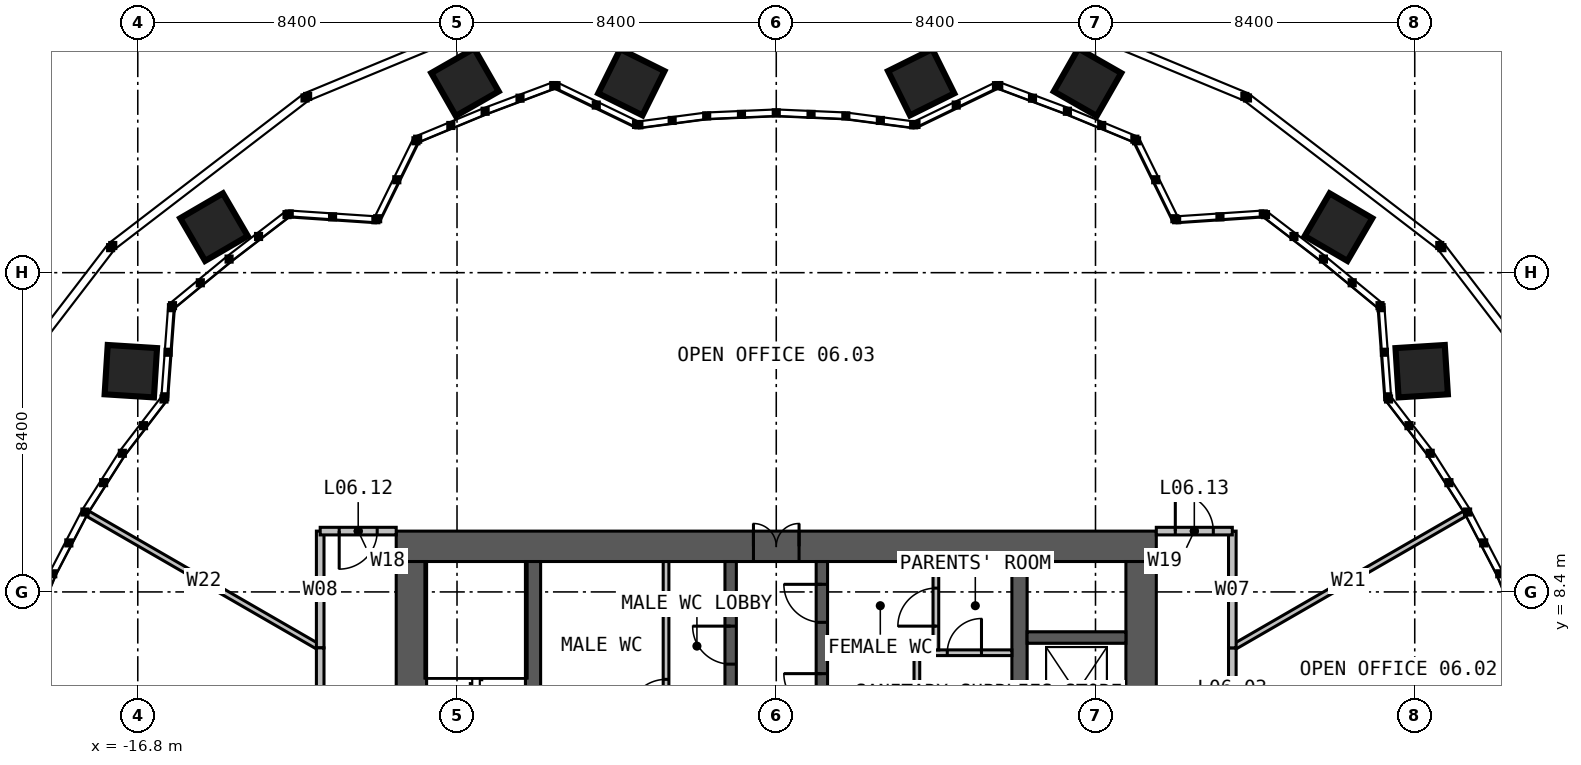
"""IFC4 building model, lengths in metres.
Left out: names, types, materials, properties, quantities, classifications, styles, units other than length and angle.
Written with IfcOpenShell. Run it as: python <this file> out.ifc"""

import sys

from ifc_helpers import new_model, si_unit, direction, frame, frame_2d, origin, place, context, subcontext, project, spatial, rectangle, extrude, element, fill, save


model = new_model("IFC4")
c1 = context("Model", 3, precision=1e-05, world=origin(), true_north=direction((0.0, 1.0)))
c2 = subcontext(c1, "Body", "Model", "MODEL_VIEW")
j1 = project(units=[si_unit("LENGTHUNIT", "METRE"), si_unit("PLANEANGLEUNIT", "RADIAN")], contexts=[c1])
p1 = place(None, origin())
s1 = spatial("IfcSite", under=j1, at=p1, CompositionType="ELEMENT")
p2 = place(p1, origin())
s2 = spatial("IfcBuilding", under=s1, at=p2, CompositionType="ELEMENT")
p3 = place(p2, frame((0.0, 0.0, 29.0)))
s3 = spatial("IfcBuildingStorey", under=s2, at=p3, CompositionType="ELEMENT", Elevation=29.0)
p4 = place(p3, frame((-10.0, 9.6, 0.0), z_axis=(0.0, 0.0, 1.0), x_axis=(1.0, 0.0, 0.0)))
e1 = element("IfcWall", 1, at=p4, inside=s3, PredefinedType="SOLIDWALL", context=c2, shape_type="SweptSolid", body=[
    extrude(rectangle(XDim=20.0, YDim=0.8, at=frame_2d((10.0, 0.0))), origin(), (0.0, 0.0, 1.0), 4.0),
])
p5 = place(p4, frame((9.4, 0.0, 0.0)))
e2 = element("IfcOpeningElement", 2, at=p5, cuts=e1, PredefinedType="OPENING", context=c2, shape_type="SweptSolid", body=[
    extrude(rectangle(XDim=1.2, YDim=2.2, at=frame_2d((0.6, 1.1))), frame((0.0, 0.41, 0.0), z_axis=(0.0, -1.0, 0.0), x_axis=(1.0, 0.0, 0.0)), (0.0, 0.0, 1.0), 0.82),
])
for number, where, z_axis, x_axis in (
    (3, (9.6, -9.2, 0.0), (0.0, 0.0, 1.0), (0.0, 1.0, 0.0)),
    (4, (-9.6, 9.2, 0.0), (0.0, 0.0, 1.0), (0.0, -1.0, 0.0)),
):
    element("IfcWall", number, at=place(p3, frame(where, z_axis=z_axis, x_axis=x_axis)), inside=s3, PredefinedType="SOLIDWALL", context=c2, shape_type="SweptSolid", body=[
        extrude(rectangle(XDim=18.4, YDim=0.8, at=frame_2d((9.2, 0.0))), origin(), (0.0, 0.0, 1.0), 4.0),
    ])
p6 = place(p3, frame((-6.4, -9.2, 0.0), z_axis=(0.0, 0.0, 1.0), x_axis=(0.0, 1.0, 0.0)))
e5 = element("IfcWall", 5, at=p6, inside=s3, PredefinedType="SOLIDWALL", context=c2, shape_type="SweptSolid", body=[
    extrude(rectangle(XDim=18.4, YDim=0.4, at=frame_2d((9.2, 0.0))), origin(), (0.0, 0.0, 1.0), 4.0),
])
p7 = place(p6, frame((8.7, 0.0, 0.0)))
e6 = element("IfcOpeningElement", 6, at=p7, cuts=e5, PredefinedType="OPENING", context=c2, shape_type="SweptSolid", body=[
    extrude(rectangle(XDim=1.0, YDim=2.2, at=frame_2d((0.5, 1.1))), frame((0.0, 0.21, 0.0), z_axis=(0.0, -1.0, 0.0), x_axis=(1.0, 0.0, 0.0)), (0.0, 0.0, 1.0), 0.42),
])
p8 = place(p3, frame((6.4, 9.2, 0.0), z_axis=(0.0, 0.0, 1.0), x_axis=(0.0, -1.0, 0.0)))
e7 = element("IfcWall", 7, at=p8, inside=s3, PredefinedType="SOLIDWALL", context=c2, shape_type="SweptSolid", body=[
    extrude(rectangle(XDim=18.4, YDim=0.4, at=frame_2d((9.2, 0.0))), origin(), (0.0, 0.0, 1.0), 4.0),
])
p9 = place(p8, frame((8.7, 0.0, 0.0)))
e8 = element("IfcOpeningElement", 8, at=p9, cuts=e7, PredefinedType="OPENING", context=c2, shape_type="SweptSolid", body=[
    extrude(rectangle(XDim=1.0, YDim=2.2, at=frame_2d((0.5, 1.1))), frame((0.0, 0.21, 0.0), z_axis=(0.0, -1.0, 0.0), x_axis=(1.0, 0.0, 0.0)), (0.0, 0.0, 1.0), 0.42),
])
p10 = place(p3, frame((-1.2, 1.45, 0.0), z_axis=(0.0, 0.0, 1.0), x_axis=(0.0, 1.0, 0.0)))
e9 = element("IfcWall", 9, at=p10, inside=s3, PredefinedType="SOLIDWALL", context=c2, shape_type="SweptSolid", body=[
    extrude(rectangle(XDim=7.75, YDim=0.3, at=frame_2d((3.875, 0.0))), origin(), (0.0, 0.0, 1.0), 4.0),
])
p11 = place(p10, frame((5.05, 0.0, 0.0)))
e10 = element("IfcOpeningElement", 10, at=p11, cuts=e9, PredefinedType="OPENING", context=c2, shape_type="SweptSolid", body=[
    extrude(rectangle(XDim=1.0, YDim=2.2, at=frame_2d((0.5, 1.1))), frame((0.0, 0.16, 0.0), z_axis=(0.0, -1.0, 0.0), x_axis=(1.0, 0.0, 0.0)), (0.0, 0.0, 1.0), 0.32),
])
p12 = place(p3, frame((1.2, 1.45, 0.0), z_axis=(0.0, 0.0, 1.0), x_axis=(0.0, 1.0, 0.0)))
e11 = element("IfcWall", 11, at=p12, inside=s3, PredefinedType="SOLIDWALL", context=c2, shape_type="SweptSolid", body=[
    extrude(rectangle(XDim=7.75, YDim=0.3, at=frame_2d((3.875, 0.0))), origin(), (0.0, 0.0, 1.0), 4.0),
])
p13 = place(p12, frame((3.8, 0.0, 0.0)))
e12 = element("IfcOpeningElement", 12, at=p13, cuts=e11, PredefinedType="OPENING", context=c2, shape_type="SweptSolid", body=[
    extrude(rectangle(XDim=1.0, YDim=2.2, at=frame_2d((0.5, 1.1))), frame((0.0, 0.16, 0.0), z_axis=(0.0, -1.0, 0.0), x_axis=(1.0, 0.0, 0.0)), (0.0, 0.0, 1.0), 0.32),
])
p14 = place(p12, frame((6.15, 0.0, 0.0)))
e13 = element("IfcOpeningElement", 13, at=p14, cuts=e11, PredefinedType="OPENING", context=c2, shape_type="SweptSolid", body=[
    extrude(rectangle(XDim=1.0, YDim=2.2, at=frame_2d((0.5, 1.1))), frame((0.0, 0.16, 0.0), z_axis=(0.0, -1.0, 0.0), x_axis=(1.0, 0.0, 0.0)), (0.0, 0.0, 1.0), 0.32),
])
p15 = place(p3, frame((6.6, 7.2, 0.0), z_axis=(0.0, 0.0, 1.0), x_axis=(1.0, 0.0, 0.0)))
e14 = element("IfcWall", 14, at=p15, inside=s3, PredefinedType="SOLIDWALL", context=c2, shape_type="SweptSolid", body=[
    extrude(rectangle(XDim=2.6, YDim=0.3, at=frame_2d((1.3, 0.0))), origin(), (0.0, 0.0, 1.0), 4.0),
])
p16 = place(p3, frame((1.35, 6.8, 0.0), z_axis=(0.0, 0.0, 1.0), x_axis=(1.0, 0.0, 0.0)))
e15 = element("IfcWall", 15, at=p16, inside=s3, PredefinedType="PARTITIONING", context=c2, shape_type="SweptSolid", body=[
    extrude(rectangle(XDim=4.85, YDim=0.15, at=frame_2d((2.425, 0.0))), origin(), (0.0, 0.0, 1.0), 3.75),
])
p17 = place(p16, frame((3.15, 0.0, 0.0)))
e16 = element("IfcOpeningElement", 16, at=p17, cuts=e15, PredefinedType="OPENING", context=c2, shape_type="SweptSolid", body=[
    extrude(rectangle(XDim=0.9, YDim=2.2, at=frame_2d((0.45, 1.1))), frame((0.0, 0.085, 0.0), z_axis=(0.0, -1.0, 0.0), x_axis=(1.0, 0.0, 0.0)), (0.0, 0.0, 1.0), 0.17),
])
p18 = place(p3, frame((3.7, 4.75, 0.0), z_axis=(0.0, 0.0, 1.0), x_axis=(0.0, 1.0, 0.0)))
e17 = element("IfcWall", 17, at=p18, inside=s3, PredefinedType="PARTITIONING", context=c2, shape_type="SweptSolid", body=[
    extrude(rectangle(XDim=1.975, YDim=0.15, at=frame_2d((0.988, 0.0))), origin(), (0.0, 0.0, 1.0), 3.75),
])
p19 = place(p3, frame((4.2, 6.875, 0.0), z_axis=(0.0, 0.0, 1.0), x_axis=(0.0, 1.0, 0.0)))
e18 = element("IfcWall", 18, at=p19, inside=s3, PredefinedType="PARTITIONING", context=c2, shape_type="SweptSolid", body=[
    extrude(rectangle(XDim=2.325, YDim=0.15, at=frame_2d((1.163, 0.0))), origin(), (0.0, 0.0, 1.0), 3.75),
])
p20 = place(p19, frame((0.625, 0.0, 0.0)))
e19 = element("IfcOpeningElement", 19, at=p20, cuts=e18, PredefinedType="OPENING", context=c2, shape_type="SweptSolid", body=[
    extrude(rectangle(XDim=1.0, YDim=2.2, at=frame_2d((0.5, 1.1))), frame((0.0, 0.085, 0.0), z_axis=(0.0, -1.0, 0.0), x_axis=(1.0, 0.0, 0.0)), (0.0, 0.0, 1.0), 0.17),
])
p21 = place(p3, frame((-2.9, 4.75, 0.0), z_axis=(0.0, 0.0, 1.0), x_axis=(0.0, 1.0, 0.0)))
e20 = element("IfcWall", 20, at=p21, inside=s3, PredefinedType="PARTITIONING", context=c2, shape_type="SweptSolid", body=[
    extrude(rectangle(XDim=4.45, YDim=0.15, at=frame_2d((2.225, 0.0))), origin(), (0.0, 0.0, 1.0), 3.75),
])
p22 = place(p21, frame((0.35, 0.0, 0.0)))
e21 = element("IfcOpeningElement", 21, at=p22, cuts=e20, PredefinedType="OPENING", context=c2, shape_type="SweptSolid", body=[
    extrude(rectangle(XDim=1.0, YDim=2.2, at=frame_2d((0.5, 1.1))), frame((0.0, 0.085, 0.0), z_axis=(0.0, -1.0, 0.0), x_axis=(1.0, 0.0, 0.0)), (0.0, 0.0, 1.0), 0.17),
])
for number, where, z_axis, x_axis in (
    (22, (12.0, 6.928, 0.0), (0.0, 0.0, 1.0), (0.866, 0.5, 0.0)),
    (23, (-12.0, 6.928, 0.0), (0.0, 0.0, 1.0), (-0.866, 0.5, 0.0)),
):
    element("IfcWall", number, at=place(p3, frame(where, z_axis=z_axis, x_axis=x_axis)), inside=s3, PredefinedType="PARTITIONING", context=c2, shape_type="SweptSolid", body=[
        extrude(rectangle(XDim=7.057, YDim=0.15, at=frame_2d((3.529, 0.0))), origin(), (0.0, 0.0, 1.0), 2.79),
    ])
p23 = place(p3, frame((12.0, 1.58, 0.0), z_axis=(0.0, 0.0, 1.0), x_axis=(0.0, 1.0, 0.0)))
e24 = element("IfcWall", 24, at=p23, inside=s3, PredefinedType="PARTITIONING", context=c2, shape_type="SweptSolid", body=[
    extrude(rectangle(XDim=5.348, YDim=0.2, at=frame_2d((2.674, 0.0))), origin(), (0.0, 0.0, 1.0), 3.8),
])
p24 = place(p23, frame((1.774, 0.0, 0.0)))
e25 = element("IfcOpeningElement", 25, at=p24, cuts=e24, PredefinedType="OPENING", context=c2, shape_type="SweptSolid", body=[
    extrude(rectangle(XDim=1.8, YDim=2.2, at=frame_2d((0.9, 1.1))), frame((0.0, 0.11, 0.0), z_axis=(0.0, -1.0, 0.0), x_axis=(1.0, 0.0, 0.0)), (0.0, 0.0, 1.0), 0.22),
])
for number, where, z_axis, x_axis in (
    (26, (12.0, 6.928, 0.0), (0.0, 0.0, 1.0), (0.0, 1.0, 0.0)),
    (27, (-12.0, 10.0, 0.0), (0.0, 0.0, 1.0), (0.0, -1.0, 0.0)),
):
    element("IfcWall", number, at=place(p3, frame(where, z_axis=z_axis, x_axis=x_axis)), inside=s3, PredefinedType="PARTITIONING", context=c2, shape_type="SweptSolid", body=[
        extrude(rectangle(XDim=3.072, YDim=0.2, at=frame_2d((1.536, 0.0))), origin(), (0.0, 0.0, 1.0), 3.8),
    ])
p25 = place(p3, frame((-12.0, 6.928, 0.0), z_axis=(0.0, 0.0, 1.0), x_axis=(0.0, -1.0, 0.0)))
e28 = element("IfcWall", 28, at=p25, inside=s3, PredefinedType="PARTITIONING", context=c2, shape_type="SweptSolid", body=[
    extrude(rectangle(XDim=6.928, YDim=0.2, at=frame_2d((3.464, 0.0))), origin(), (0.0, 0.0, 1.0), 3.8),
])
p26 = place(p25, frame((2.564, 0.0, 0.0)))
e29 = element("IfcOpeningElement", 29, at=p26, cuts=e28, PredefinedType="OPENING", context=c2, shape_type="SweptSolid", body=[
    extrude(rectangle(XDim=1.8, YDim=2.2, at=frame_2d((0.9, 1.1))), frame((0.0, 0.11, 0.0), z_axis=(0.0, -1.0, 0.0), x_axis=(1.0, 0.0, 0.0)), (0.0, 0.0, 1.0), 0.22),
])
p27 = place(p3, frame((-10.0, 10.0, 0.0), z_axis=(0.0, 0.0, 1.0), x_axis=(-1.0, 0.0, 0.0)))
e30 = element("IfcWall", 30, at=p27, inside=s3, PredefinedType="PARTITIONING", context=c2, shape_type="SweptSolid", body=[
    extrude(rectangle(XDim=2.0, YDim=0.2, at=frame_2d((1.0, 0.0))), origin(), (0.0, 0.0, 1.0), 3.8),
])
p28 = place(p27, frame((0.5, 0.0, 0.0)))
e31 = element("IfcOpeningElement", 31, at=p28, cuts=e30, PredefinedType="OPENING", context=c2, shape_type="SweptSolid", body=[
    extrude(rectangle(XDim=1.0, YDim=2.2, at=frame_2d((0.5, 1.1))), frame((0.0, 0.11, 0.0), z_axis=(0.0, -1.0, 0.0), x_axis=(1.0, 0.0, 0.0)), (0.0, 0.0, 1.0), 0.22),
])
p29 = place(p3, frame((10.0, 10.0, 0.0), z_axis=(0.0, 0.0, 1.0), x_axis=(1.0, 0.0, 0.0)))
e32 = element("IfcWall", 32, at=p29, inside=s3, PredefinedType="PARTITIONING", context=c2, shape_type="SweptSolid", body=[
    extrude(rectangle(XDim=2.0, YDim=0.2, at=frame_2d((1.0, 0.0))), origin(), (0.0, 0.0, 1.0), 3.8),
])
p30 = place(p29, frame((0.5, 0.0, 0.0)))
e33 = element("IfcOpeningElement", 33, at=p30, cuts=e32, PredefinedType="OPENING", context=c2, shape_type="SweptSolid", body=[
    extrude(rectangle(XDim=1.0, YDim=2.2, at=frame_2d((0.5, 1.1))), frame((0.0, 0.11, 0.0), z_axis=(0.0, -1.0, 0.0), x_axis=(1.0, 0.0, 0.0)), (0.0, 0.0, 1.0), 0.22),
])
p31 = place(p5, origin())
e34 = element("IfcDoor", 34, at=p31, inside=s3, OperationType="DOUBLE_DOOR_SINGLE_SWING", PredefinedType="DOOR", context=c2, shape_type="SweptSolid", body=[
    extrude(rectangle(XDim=1.2, YDim=2.2, at=frame_2d((0.6, 1.1))), frame((0.0, 0.025, 0.0), z_axis=(0.0, -1.0, 0.0), x_axis=(1.0, 0.0, 0.0)), (0.0, 0.0, 1.0), 0.05),
])
fill(e2, e34)
p32 = place(p11, origin())
e35 = element("IfcDoor", 35, at=p32, inside=s3, OperationType="SINGLE_SWING_RIGHT", PredefinedType="DOOR", context=c2, shape_type="SweptSolid", body=[
    extrude(rectangle(XDim=1.0, YDim=2.2, at=frame_2d((0.5, 1.1))), frame((0.0, 0.025, 0.0), z_axis=(0.0, -1.0, 0.0), x_axis=(1.0, 0.0, 0.0)), (0.0, 0.0, 1.0), 0.05),
])
fill(e10, e35)
p33 = place(p13, origin())
e36 = element("IfcDoor", 36, at=p33, inside=s3, OperationType="SINGLE_SWING_RIGHT", PredefinedType="DOOR", context=c2, shape_type="SweptSolid", body=[
    extrude(rectangle(XDim=1.0, YDim=2.2, at=frame_2d((0.5, 1.1))), frame((0.0, 0.025, 0.0), z_axis=(0.0, -1.0, 0.0), x_axis=(1.0, 0.0, 0.0)), (0.0, 0.0, 1.0), 0.05),
])
fill(e12, e36)
p34 = place(p14, origin())
e37 = element("IfcDoor", 37, at=p34, inside=s3, OperationType="SINGLE_SWING_RIGHT", PredefinedType="DOOR", context=c2, shape_type="SweptSolid", body=[
    extrude(rectangle(XDim=1.0, YDim=2.2, at=frame_2d((0.5, 1.1))), frame((0.0, 0.025, 0.0), z_axis=(0.0, -1.0, 0.0), x_axis=(1.0, 0.0, 0.0)), (0.0, 0.0, 1.0), 0.05),
])
fill(e13, e37)
p35 = place(p17, origin())
e38 = element("IfcDoor", 38, at=p35, inside=s3, OperationType="SINGLE_SWING_RIGHT", PredefinedType="DOOR", context=c2, shape_type="SweptSolid", body=[
    extrude(rectangle(XDim=0.9, YDim=2.2, at=frame_2d((0.45, 1.1))), frame((0.0, 0.025, 0.0), z_axis=(0.0, -1.0, 0.0), x_axis=(1.0, 0.0, 0.0)), (0.0, 0.0, 1.0), 0.05),
])
fill(e16, e38)
p36 = place(p20, origin())
e39 = element("IfcDoor", 39, at=p36, inside=s3, OperationType="SINGLE_SWING_LEFT", PredefinedType="DOOR", context=c2, shape_type="SweptSolid", body=[
    extrude(rectangle(XDim=1.0, YDim=2.2, at=frame_2d((0.5, 1.1))), frame((0.0, 0.025, 0.0), z_axis=(0.0, -1.0, 0.0), x_axis=(1.0, 0.0, 0.0)), (0.0, 0.0, 1.0), 0.05),
])
fill(e19, e39)
p37 = place(p22, origin())
e40 = element("IfcDoor", 40, at=p37, inside=s3, OperationType="SINGLE_SWING_LEFT", PredefinedType="DOOR", context=c2, shape_type="SweptSolid", body=[
    extrude(rectangle(XDim=1.0, YDim=2.2, at=frame_2d((0.5, 1.1))), frame((0.0, 0.025, 0.0), z_axis=(0.0, -1.0, 0.0), x_axis=(1.0, 0.0, 0.0)), (0.0, 0.0, 1.0), 0.05),
])
fill(e21, e40)
p38 = place(p28, origin())
e41 = element("IfcDoor", 41, at=p38, inside=s3, OperationType="SINGLE_SWING_RIGHT", PredefinedType="DOOR", context=c2, shape_type="SweptSolid", body=[
    extrude(rectangle(XDim=1.0, YDim=2.2, at=frame_2d((0.5, 1.1))), frame((0.0, 0.025, 0.0), z_axis=(0.0, -1.0, 0.0), x_axis=(1.0, 0.0, 0.0)), (0.0, 0.0, 1.0), 0.05),
])
fill(e31, e41)
p39 = place(p30, origin())
e42 = element("IfcDoor", 42, at=p39, inside=s3, OperationType="SINGLE_SWING_LEFT", PredefinedType="DOOR", context=c2, shape_type="SweptSolid", body=[
    extrude(rectangle(XDim=1.0, YDim=2.2, at=frame_2d((0.5, 1.1))), frame((0.0, 0.025, 0.0), z_axis=(0.0, -1.0, 0.0), x_axis=(1.0, 0.0, 0.0)), (0.0, 0.0, 1.0), 0.05),
])
fill(e33, e42)
save(model, sys.argv[1])
